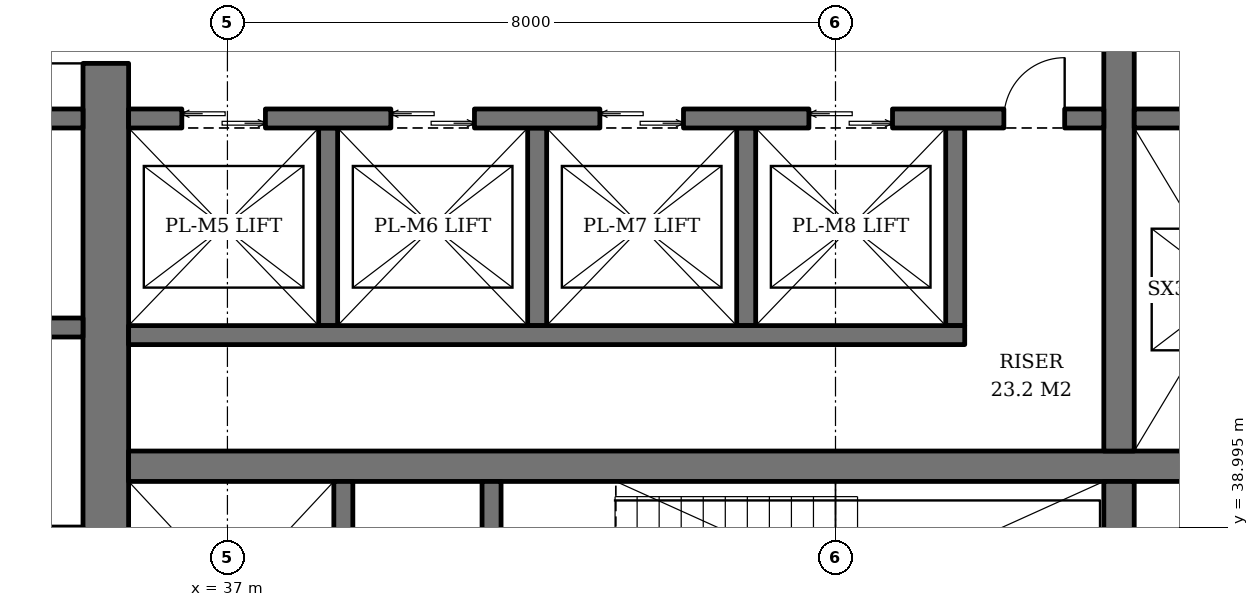
"""IFC4 building model, lengths in metres.
Left out: names, types, materials, properties, quantities, classifications, styles, units other than length and angle.
Written with IfcOpenShell. Run it as: python <this file> out.ifc"""

import sys

from ifc_helpers import new_model, si_unit, direction, frame, frame_2d, origin, place, context, subcontext, project, spatial, rectangle, extrude, element, fill, save


model = new_model("IFC4")
c1 = context("Model", 3, precision=1e-05, world=origin(), true_north=direction((0.0, 1.0)))
c2 = subcontext(c1, "Body", "Model", "MODEL_VIEW")
j1 = project(units=[si_unit("LENGTHUNIT", "METRE"), si_unit("PLANEANGLEUNIT", "RADIAN")], contexts=[c1])
p1 = place(None, origin())
s1 = spatial("IfcSite", under=j1, at=p1, CompositionType="ELEMENT")
p2 = place(p1, origin())
s2 = spatial("IfcBuilding", under=s1, at=p2, CompositionType="ELEMENT")
p3 = place(p2, frame((0.0, 0.0, 138.8)))
s3 = spatial("IfcBuildingStorey", under=s2, at=p3, CompositionType="ELEMENT", Elevation=138.8)
p4 = place(p3, frame((35.4, 36.7, 0.0), z_axis=(0.0, 0.0, 1.0), x_axis=(0.0, 1.0, 0.0)))
e1 = element("IfcWall", 1, at=p4, inside=s3, PredefinedType="SHEAR", context=c2, shape_type="SweptSolid", body=[
    extrude(rectangle(XDim=18.6, YDim=0.6, at=frame_2d((9.3, 0.0))), origin(), (0.0, 0.0, 1.0), 3.8),
])
p5 = place(p4, frame((8.4, 0.0, 0.0)))
e2 = element("IfcOpeningElement", 2, at=p5, cuts=e1, PredefinedType="OPENING", context=c2, shape_type="SweptSolid", body=[
    extrude(rectangle(XDim=1.8, YDim=2.4, at=frame_2d((0.9, 1.2))), frame((0.0, 0.31, 0.0), z_axis=(0.0, -1.0, 0.0), x_axis=(1.0, 0.0, 0.0)), (0.0, 0.0, 1.0), 0.62),
])
p6 = place(p3, frame((35.7, 39.8, 0.0), z_axis=(0.0, 0.0, 1.0), x_axis=(1.0, 0.0, 0.0)))
e3 = element("IfcWall", 3, at=p6, inside=s3, PredefinedType="SHEAR", context=c2, shape_type="SweptSolid", body=[
    extrude(rectangle(XDim=18.6, YDim=0.4, at=frame_2d((9.3, 0.0))), origin(), (0.0, 0.0, 1.0), 3.8),
])
p7 = place(p3, frame((48.73, 36.7, 0.0), z_axis=(0.0, 0.0, 1.0), x_axis=(0.0, 1.0, 0.0)))
e4 = element("IfcWall", 4, at=p7, inside=s3, PredefinedType="SHEAR", context=c2, shape_type="SweptSolid", body=[
    extrude(rectangle(XDim=2.9, YDim=0.4, at=frame_2d((1.45, 0.0))), origin(), (0.0, 0.0, 1.0), 3.8),
])
p8 = place(p3, frame((48.73, 40.0, 0.0), z_axis=(0.0, 0.0, 1.0), x_axis=(0.0, 1.0, 0.0)))
e5 = element("IfcWall", 5, at=p8, inside=s3, PredefinedType="SHEAR", context=c2, shape_type="SweptSolid", body=[
    extrude(rectangle(XDim=12.0, YDim=0.4, at=frame_2d((6.0, 0.0))), origin(), (0.0, 0.0, 1.0), 3.8),
])
p9 = place(p3, frame((38.525, 36.7, 0.0), z_axis=(0.0, 0.0, 1.0), x_axis=(0.0, 1.0, 0.0)))
e6 = element("IfcWall", 6, at=p9, inside=s3, PredefinedType="SHEAR", context=c2, shape_type="SweptSolid", body=[
    extrude(rectangle(XDim=2.9, YDim=0.25, at=frame_2d((1.45, 0.0))), origin(), (0.0, 0.0, 1.0), 3.8),
])
p10 = place(p9, frame((0.8, 0.0, 0.0)))
e7 = element("IfcOpeningElement", 7, at=p10, cuts=e6, PredefinedType="OPENING", context=c2, shape_type="SweptSolid", body=[
    extrude(rectangle(XDim=1.3, YDim=2.2, at=frame_2d((0.65, 1.1))), frame((0.0, 0.135, 0.0), z_axis=(0.0, -1.0, 0.0), x_axis=(1.0, 0.0, 0.0)), (0.0, 0.0, 1.0), 0.27),
])
p11 = place(p3, frame((40.475, 36.7, 0.0), z_axis=(0.0, 0.0, 1.0), x_axis=(0.0, 1.0, 0.0)))
e8 = element("IfcWall", 8, at=p11, inside=s3, PredefinedType="SHEAR", context=c2, shape_type="SweptSolid", body=[
    extrude(rectangle(XDim=2.9, YDim=0.25, at=frame_2d((1.45, 0.0))), origin(), (0.0, 0.0, 1.0), 3.8),
])
p12 = place(p11, frame((0.75, 0.0, 0.0)))
e9 = element("IfcOpeningElement", 9, at=p12, cuts=e8, PredefinedType="OPENING", context=c2, shape_type="SweptSolid", body=[
    extrude(rectangle(XDim=1.2, YDim=2.1, at=frame_2d((0.6, 1.05))), frame((0.0, 0.135, 0.0), z_axis=(0.0, -1.0, 0.0), x_axis=(1.0, 0.0, 0.0)), (0.0, 0.0, 1.0), 0.27),
])
for number, where, z_axis, x_axis in (
    (10, (38.325, 44.25, 0.0), (0.0, 0.0, 1.0), (0.0, -1.0, 0.0)),
    (11, (41.075, 44.25, 0.0), (0.0, 0.0, 1.0), (0.0, -1.0, 0.0)),
    (12, (43.825, 44.25, 0.0), (0.0, 0.0, 1.0), (0.0, -1.0, 0.0)),
    (13, (46.575, 44.25, 0.0), (0.0, 0.0, 1.0), (0.0, -1.0, 0.0)),
):
    element("IfcWall", number, at=place(p3, frame(where, z_axis=z_axis, x_axis=x_axis)), inside=s3, PredefinedType="SHEAR", context=c2, shape_type="SweptSolid", body=[
        extrude(rectangle(XDim=2.6, YDim=0.25, at=frame_2d((1.3, 0.0))), origin(), (0.0, 0.0, 1.0), 3.8),
    ])
p13 = place(p3, frame((35.7, 41.525, 0.0), z_axis=(0.0, 0.0, 1.0), x_axis=(1.0, 0.0, 0.0)))
e14 = element("IfcWall", 14, at=p13, inside=s3, PredefinedType="SHEAR", context=c2, shape_type="SweptSolid", body=[
    extrude(rectangle(XDim=11.0, YDim=0.25, at=frame_2d((5.5, 0.0))), origin(), (0.0, 0.0, 1.0), 3.8),
])
p14 = place(p3, frame((35.7, 44.375, 0.0), z_axis=(0.0, 0.0, 1.0), x_axis=(1.0, 0.0, 0.0)))
e15 = element("IfcWall", 15, at=p14, inside=s3, PredefinedType="SHEAR", context=c2, shape_type="SweptSolid", body=[
    extrude(rectangle(XDim=12.83, YDim=0.25, at=frame_2d((6.415, 0.0))), origin(), (0.0, 0.0, 1.0), 3.8),
])
p15 = place(p14, frame((0.7, 0.0, 0.0)))
e16 = element("IfcOpeningElement", 16, at=p15, cuts=e15, PredefinedType="OPENING", context=c2, shape_type="SweptSolid", body=[
    extrude(rectangle(XDim=1.1, YDim=2.2, at=frame_2d((0.55, 1.1))), frame((0.0, 0.135, 0.0), z_axis=(0.0, -1.0, 0.0), x_axis=(1.0, 0.0, 0.0)), (0.0, 0.0, 1.0), 0.27),
])
p16 = place(p14, frame((3.45, 0.0, 0.0)))
e17 = element("IfcOpeningElement", 17, at=p16, cuts=e15, PredefinedType="OPENING", context=c2, shape_type="SweptSolid", body=[
    extrude(rectangle(XDim=1.1, YDim=2.2, at=frame_2d((0.55, 1.1))), frame((0.0, 0.135, 0.0), z_axis=(0.0, -1.0, 0.0), x_axis=(1.0, 0.0, 0.0)), (0.0, 0.0, 1.0), 0.27),
])
p17 = place(p14, frame((6.2, 0.0, 0.0)))
e18 = element("IfcOpeningElement", 18, at=p17, cuts=e15, PredefinedType="OPENING", context=c2, shape_type="SweptSolid", body=[
    extrude(rectangle(XDim=1.1, YDim=2.2, at=frame_2d((0.55, 1.1))), frame((0.0, 0.135, 0.0), z_axis=(0.0, -1.0, 0.0), x_axis=(1.0, 0.0, 0.0)), (0.0, 0.0, 1.0), 0.27),
])
p18 = place(p14, frame((8.95, 0.0, 0.0)))
e19 = element("IfcOpeningElement", 19, at=p18, cuts=e15, PredefinedType="OPENING", context=c2, shape_type="SweptSolid", body=[
    extrude(rectangle(XDim=1.1, YDim=2.2, at=frame_2d((0.55, 1.1))), frame((0.0, 0.135, 0.0), z_axis=(0.0, -1.0, 0.0), x_axis=(1.0, 0.0, 0.0)), (0.0, 0.0, 1.0), 0.27),
])
p19 = place(p14, frame((11.515, 0.0, 0.0)))
e20 = element("IfcOpeningElement", 20, at=p19, cuts=e15, PredefinedType="OPENING", context=c2, shape_type="SweptSolid", body=[
    extrude(rectangle(XDim=0.8, YDim=2.0, at=frame_2d((0.4, 1.0))), frame((0.0, 0.135, 0.0), z_axis=(0.0, -1.0, 0.0), x_axis=(1.0, 0.0, 0.0)), (0.0, 0.0, 1.0), 0.27),
])
p20 = place(p3, frame((48.93, 44.375, 0.0), z_axis=(0.0, 0.0, 1.0), x_axis=(1.0, 0.0, 0.0)))
e21 = element("IfcWall", 21, at=p20, inside=s3, PredefinedType="SHEAR", context=c2, shape_type="SweptSolid", body=[
    extrude(rectangle(XDim=5.37, YDim=0.25, at=frame_2d((2.685, 0.0))), origin(), (0.0, 0.0, 1.0), 3.8),
])
for number, where, z_axis, x_axis in (
    (22, (32.4, 41.625, 0.0), (0.0, 0.0, 1.0), (1.0, 0.0, 0.0)),
    (23, (32.4, 44.375, 0.0), (0.0, 0.0, 1.0), (1.0, 0.0, 0.0)),
):
    element("IfcWall", number, at=place(p3, frame(where, z_axis=z_axis, x_axis=x_axis)), inside=s3, PredefinedType="SHEAR", context=c2, shape_type="SweptSolid", body=[
        extrude(rectangle(XDim=2.7, YDim=0.25, at=frame_2d((1.35, 0.0))), origin(), (0.0, 0.0, 1.0), 3.8),
    ])
p21 = place(p15, origin())
e24 = element("IfcDoor", 24, at=p21, inside=s3, OperationType="DOUBLE_DOOR_SLIDING", PredefinedType="DOOR", context=c2, shape_type="SweptSolid", body=[
    extrude(rectangle(XDim=1.1, YDim=2.2, at=frame_2d((0.55, 1.1))), frame((0.0, 0.025, 0.0), z_axis=(0.0, -1.0, 0.0), x_axis=(1.0, 0.0, 0.0)), (0.0, 0.0, 1.0), 0.05),
])
fill(e16, e24)
p22 = place(p16, origin())
e25 = element("IfcDoor", 25, at=p22, inside=s3, OperationType="DOUBLE_DOOR_SLIDING", PredefinedType="DOOR", context=c2, shape_type="SweptSolid", body=[
    extrude(rectangle(XDim=1.1, YDim=2.2, at=frame_2d((0.55, 1.1))), frame((0.0, 0.025, 0.0), z_axis=(0.0, -1.0, 0.0), x_axis=(1.0, 0.0, 0.0)), (0.0, 0.0, 1.0), 0.05),
])
fill(e17, e25)
p23 = place(p17, origin())
e26 = element("IfcDoor", 26, at=p23, inside=s3, OperationType="DOUBLE_DOOR_SLIDING", PredefinedType="DOOR", context=c2, shape_type="SweptSolid", body=[
    extrude(rectangle(XDim=1.1, YDim=2.2, at=frame_2d((0.55, 1.1))), frame((0.0, 0.025, 0.0), z_axis=(0.0, -1.0, 0.0), x_axis=(1.0, 0.0, 0.0)), (0.0, 0.0, 1.0), 0.05),
])
fill(e18, e26)
p24 = place(p18, origin())
e27 = element("IfcDoor", 27, at=p24, inside=s3, OperationType="DOUBLE_DOOR_SLIDING", PredefinedType="DOOR", context=c2, shape_type="SweptSolid", body=[
    extrude(rectangle(XDim=1.1, YDim=2.2, at=frame_2d((0.55, 1.1))), frame((0.0, 0.025, 0.0), z_axis=(0.0, -1.0, 0.0), x_axis=(1.0, 0.0, 0.0)), (0.0, 0.0, 1.0), 0.05),
])
fill(e19, e27)
p25 = place(p19, origin())
e28 = element("IfcDoor", 28, at=p25, inside=s3, OperationType="SINGLE_SWING_RIGHT", PredefinedType="DOOR", context=c2, shape_type="SweptSolid", body=[
    extrude(rectangle(XDim=0.8, YDim=2.0, at=frame_2d((0.4, 1.0))), frame((0.0, 0.025, 0.0), z_axis=(0.0, -1.0, 0.0), x_axis=(1.0, 0.0, 0.0)), (0.0, 0.0, 1.0), 0.05),
])
fill(e20, e28)
p26 = place(p5, origin())
e29 = element("IfcDoor", 29, at=p26, inside=s3, OperationType="DOUBLE_DOOR_SINGLE_SWING", PredefinedType="DOOR", context=c2, shape_type="SweptSolid", body=[
    extrude(rectangle(XDim=1.8, YDim=2.4, at=frame_2d((0.9, 1.2))), frame((0.0, 0.025, 0.0), z_axis=(0.0, -1.0, 0.0), x_axis=(1.0, 0.0, 0.0)), (0.0, 0.0, 1.0), 0.05),
])
fill(e2, e29)
save(model, sys.argv[1])
